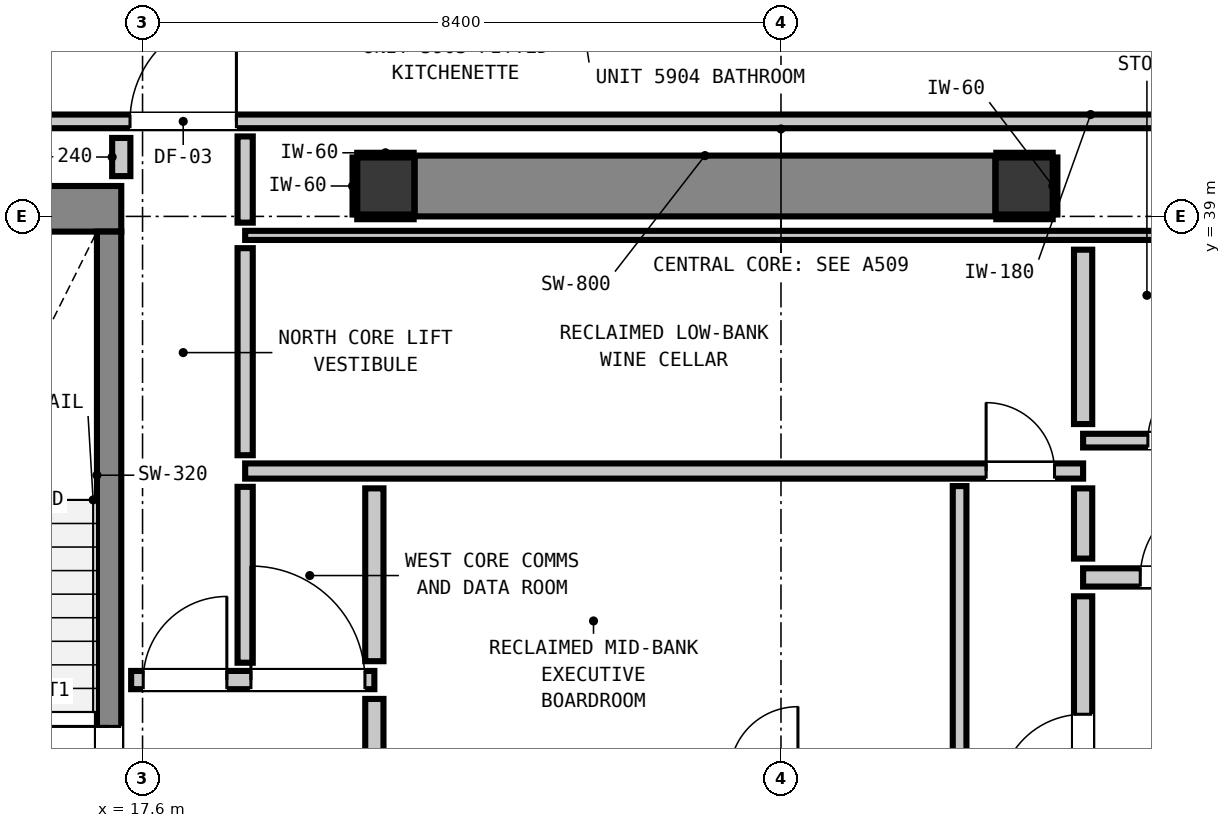
"""IFC4 building model, lengths in metres.
Left out: names, types, materials, properties, quantities, classifications, styles, units other than length and angle.
Written with IfcOpenShell. Run it as: python <this file> out.ifc"""

import sys

from ifc_helpers import new_model, si_unit, direction, frame, frame_2d, origin, origin_2d, place, context, subcontext, project, spatial, rectangle, extrude, element, fill, save


model = new_model("IFC4")
c1 = context("Model", 3, precision=1e-05, world=origin(), true_north=direction((0.0, 1.0)))
c2 = subcontext(c1, "Body", "Model", "MODEL_VIEW")
j1 = project(units=[si_unit("LENGTHUNIT", "METRE"), si_unit("PLANEANGLEUNIT", "RADIAN")], contexts=[c1])
p1 = place(None, origin())
s1 = spatial("IfcSite", under=j1, at=p1, CompositionType="ELEMENT")
p2 = place(p1, origin())
s2 = spatial("IfcBuilding", under=s1, at=p2, CompositionType="ELEMENT")
p3 = place(p2, frame((0.0, 0.0, 203.44)))
s3 = spatial("IfcBuildingStorey", under=s2, at=p3, CompositionType="ELEMENT", Elevation=203.44)
for number, where, z_axis, x_axis in (
    (1, (20.8, 39.4, 0.0), (0.0, 0.0, 1.0), (1.0, 0.0, 0.0)),
    (2, (29.2, 39.4, 0.0), (0.0, 0.0, 1.0), (1.0, 0.0, 0.0)),
):
    element("IfcColumn", number, at=place(p3, frame(where, z_axis=z_axis, x_axis=x_axis)), inside=s3, PredefinedType="COLUMN", context=c2, shape_type="SweptSolid", body=[
        extrude(rectangle(XDim=0.75, YDim=0.75, at=origin_2d()), origin(), (0.0, 0.0, 1.0), 3.32),
    ])
p4 = place(p3, frame((13.24, 39.1, 0.0), z_axis=(0.0, 0.0, 1.0), x_axis=(1.0, 0.0, 0.0)))
e3 = element("IfcWall", 3, at=p4, inside=s3, PredefinedType="SHEAR", context=c2, shape_type="SweptSolid", body=[
    extrude(rectangle(XDim=4.08, YDim=0.6, at=frame_2d((2.04, 0.0))), origin(), (0.0, 0.0, 1.0), 3.32),
])
p5 = place(p3, frame((21.18, 39.4, 0.0), z_axis=(0.0, 0.0, 1.0), x_axis=(1.0, 0.0, 0.0)))
e4 = element("IfcWall", 4, at=p5, inside=s3, PredefinedType="SHEAR", context=c2, shape_type="SweptSolid", body=[
    extrude(rectangle(XDim=7.64, YDim=0.8, at=frame_2d((3.82, 0.0))), origin(), (0.0, 0.0, 1.0), 3.32),
])
p6 = place(p3, frame((17.16, 31.0, 0.0), z_axis=(0.0, 0.0, 1.0), x_axis=(0.0, 1.0, 0.0)))
e5 = element("IfcWall", 5, at=p6, inside=s3, PredefinedType="SHEAR", context=c2, shape_type="SweptSolid", body=[
    extrude(rectangle(XDim=7.8, YDim=0.32, at=frame_2d((3.9, 0.0))), origin(), (0.0, 0.0, 1.0), 3.32),
])
p7 = place(p6, frame((0.19, 0.0, 0.0)))
e6 = element("IfcOpeningElement", 6, at=p7, cuts=e5, PredefinedType="OPENING", context=c2, shape_type="SweptSolid", body=[
    extrude(rectangle(XDim=1.1, YDim=2.15, at=frame_2d((0.55, 1.075))), frame((0.0, 0.17, 0.0), z_axis=(0.0, -1.0, 0.0), x_axis=(1.0, 0.0, 0.0)), (0.0, 0.0, 1.0), 0.34),
])
p8 = place(p3, frame((17.45, 32.9, 0.0), z_axis=(0.0, 0.0, 1.0), x_axis=(1.0, 0.0, 0.0)))
e7 = element("IfcWall", 7, at=p8, inside=s3, PredefinedType="PARTITIONING", context=c2, shape_type="SweptSolid", body=[
    extrude(rectangle(XDim=3.2, YDim=0.24, at=frame_2d((1.6, 0.0))), origin(), (0.0, 0.0, 1.0), 3.1),
])
p9 = place(p8, frame((0.159, 0.0, 0.0)))
e8 = element("IfcOpeningElement", 8, at=p9, cuts=e7, PredefinedType="OPENING", context=c2, shape_type="SweptSolid", body=[
    extrude(rectangle(XDim=1.1, YDim=2.15, at=frame_2d((0.55, 1.075))), frame((0.0, 0.13, 0.0), z_axis=(0.0, -1.0, 0.0), x_axis=(1.0, 0.0, 0.0)), (0.0, 0.0, 1.0), 0.26),
])
p10 = place(p8, frame((1.576, 0.0, 0.0)))
e9 = element("IfcOpeningElement", 9, at=p10, cuts=e7, PredefinedType="OPENING", context=c2, shape_type="SweptSolid", body=[
    extrude(rectangle(XDim=1.5, YDim=2.15, at=frame_2d((0.75, 1.075))), frame((0.0, 0.13, 0.0), z_axis=(0.0, -1.0, 0.0), x_axis=(1.0, 0.0, 0.0)), (0.0, 0.0, 1.0), 0.26),
])
p11 = place(p3, frame((29.975, 34.25, 0.0), z_axis=(0.0, 0.0, 1.0), x_axis=(1.0, 0.0, 0.0)))
e10 = element("IfcWall", 10, at=p11, inside=s3, PredefinedType="PARTITIONING", context=c2, shape_type="SweptSolid", body=[
    extrude(rectangle(XDim=2.475, YDim=0.24, at=frame_2d((1.237, 0.0))), origin(), (0.0, 0.0, 1.0), 3.1),
])
p12 = place(p11, frame((0.752, 0.0, 0.0)))
e11 = element("IfcOpeningElement", 11, at=p12, cuts=e10, PredefinedType="OPENING", context=c2, shape_type="SweptSolid", body=[
    extrude(rectangle(XDim=1.1, YDim=2.15, at=frame_2d((0.55, 1.075))), frame((0.0, 0.13, 0.0), z_axis=(0.0, -1.0, 0.0), x_axis=(1.0, 0.0, 0.0)), (0.0, 0.0, 1.0), 0.26),
])
p13 = place(p3, frame((18.95, 35.65, 0.0), z_axis=(0.0, 0.0, 1.0), x_axis=(1.0, 0.0, 0.0)))
e12 = element("IfcWall", 12, at=p13, inside=s3, PredefinedType="PARTITIONING", context=c2, shape_type="SweptSolid", body=[
    extrude(rectangle(XDim=11.025, YDim=0.2, at=frame_2d((5.513, 0.0))), origin(), (0.0, 0.0, 1.0), 3.1),
])
p14 = place(p13, frame((9.749, 0.0, 0.0)))
e13 = element("IfcOpeningElement", 13, at=p14, cuts=e12, PredefinedType="OPENING", context=c2, shape_type="SweptSolid", body=[
    extrude(rectangle(XDim=0.9, YDim=2.1, at=frame_2d((0.45, 1.05))), frame((0.0, 0.11, 0.0), z_axis=(0.0, -1.0, 0.0), x_axis=(1.0, 0.0, 0.0)), (0.0, 0.0, 1.0), 0.22),
])
p15 = place(p3, frame((29.975, 36.05, 0.0), z_axis=(0.0, 0.0, 1.0), x_axis=(1.0, 0.0, 0.0)))
e14 = element("IfcWall", 14, at=p15, inside=s3, PredefinedType="PARTITIONING", context=c2, shape_type="SweptSolid", body=[
    extrude(rectangle(XDim=2.505, YDim=0.18, at=frame_2d((1.252, 0.0))), origin(), (0.0, 0.0, 1.0), 3.1),
])
p16 = place(p15, frame((0.852, 0.0, 0.0)))
e15 = element("IfcOpeningElement", 15, at=p16, cuts=e14, PredefinedType="OPENING", context=c2, shape_type="SweptSolid", body=[
    extrude(rectangle(XDim=0.9, YDim=2.1, at=frame_2d((0.45, 1.05))), frame((0.0, 0.1, 0.0), z_axis=(0.0, -1.0, 0.0), x_axis=(1.0, 0.0, 0.0)), (0.0, 0.0, 1.0), 0.2),
])
p17 = place(p3, frame((13.012, 40.25, 0.0), z_axis=(0.0, 0.0, 1.0), x_axis=(1.0, 0.0, 0.0)))
e16 = element("IfcWall", 16, at=p17, inside=s3, PredefinedType="PARTITIONING", context=c2, shape_type="SweptSolid", body=[
    extrude(rectangle(XDim=28.201, YDim=0.18, at=frame_2d((14.101, 0.0))), origin(), (0.0, 0.0, 1.0), 3.1),
])
p18 = place(p17, frame((4.423, 0.0, 0.0)))
e17 = element("IfcOpeningElement", 17, at=p18, cuts=e16, PredefinedType="OPENING", context=c2, shape_type="SweptSolid", body=[
    extrude(rectangle(XDim=1.4, YDim=2.15, at=frame_2d((0.7, 1.075))), frame((0.0, 0.1, 0.0), z_axis=(0.0, -1.0, 0.0), x_axis=(1.0, 0.0, 0.0)), (0.0, 0.0, 1.0), 0.2),
])
p19 = place(p3, frame((18.95, 38.75, 0.0), z_axis=(0.0, 0.0, 1.0), x_axis=(1.0, 0.0, 0.0)))
e18 = element("IfcWall", 18, at=p19, inside=s3, PredefinedType="PARTITIONING", context=c2, shape_type="SweptSolid", body=[
    extrude(rectangle(XDim=13.56, YDim=0.12, at=frame_2d((6.78, 0.0))), origin(), (0.0, 0.0, 1.0), 3.1),
])
p20 = place(p3, frame((17.32, 39.53, 0.0), z_axis=(0.0, 0.0, 1.0), x_axis=(0.0, 1.0, 0.0)))
e19 = element("IfcWall", 19, at=p20, inside=s3, PredefinedType="PARTITIONING", context=c2, shape_type="SweptSolid", body=[
    extrude(rectangle(XDim=0.502, YDim=0.24, at=frame_2d((0.251, 0.0))), origin(), (0.0, 0.0, 1.0), 3.1),
])
p21 = place(p3, frame((20.65, 31.868, 0.0), z_axis=(0.0, 0.0, 1.0), x_axis=(0.0, 1.0, 0.0)))
e20 = element("IfcWall", 20, at=p21, inside=s3, PredefinedType="PARTITIONING", context=c2, shape_type="SweptSolid", body=[
    extrude(rectangle(XDim=0.784, YDim=0.24, at=frame_2d((0.392, 0.0))), origin(), (0.0, 0.0, 1.0), 2.335),
])
p22 = place(p3, frame((20.65, 33.148, 0.0), z_axis=(0.0, 0.0, 1.0), x_axis=(0.0, 1.0, 0.0)))
e21 = element("IfcWall", 21, at=p22, inside=s3, PredefinedType="PARTITIONING", context=c2, shape_type="SweptSolid", body=[
    extrude(rectangle(XDim=2.274, YDim=0.24, at=frame_2d((1.137, 0.0))), origin(), (0.0, 0.0, 1.0), 2.335),
])
p23 = place(p3, frame((29.975, 29.768, 0.0), z_axis=(0.0, 0.0, 1.0), x_axis=(0.0, 1.0, 0.0)))
e22 = element("IfcWall", 22, at=p23, inside=s3, PredefinedType="PARTITIONING", context=c2, shape_type="SweptSolid", body=[
    extrude(rectangle(XDim=4.234, YDim=0.24, at=frame_2d((2.117, 0.0))), origin(), (0.0, 0.0, 1.0), 3.1),
])
p24 = place(p23, frame((1.582, 0.0, 0.0)))
e23 = element("IfcOpeningElement", 23, at=p24, cuts=e22, PredefinedType="OPENING", context=c2, shape_type="SweptSolid", body=[
    extrude(rectangle(XDim=1.1, YDim=2.15, at=frame_2d((0.55, 1.075))), frame((0.0, 0.13, 0.0), z_axis=(0.0, -1.0, 0.0), x_axis=(1.0, 0.0, 0.0)), (0.0, 0.0, 1.0), 0.26),
])
p25 = place(p3, frame((29.975, 34.498, 0.0), z_axis=(0.0, 0.0, 1.0), x_axis=(0.0, 1.0, 0.0)))
e24 = element("IfcWall", 24, at=p25, inside=s3, PredefinedType="PARTITIONING", context=c2, shape_type="SweptSolid", body=[
    extrude(rectangle(XDim=0.924, YDim=0.24, at=frame_2d((0.462, 0.0))), origin(), (0.0, 0.0, 1.0), 3.1),
])
p26 = place(p3, frame((29.975, 36.268, 0.0), z_axis=(0.0, 0.0, 1.0), x_axis=(0.0, 1.0, 0.0)))
e25 = element("IfcWall", 25, at=p26, inside=s3, PredefinedType="PARTITIONING", context=c2, shape_type="SweptSolid", body=[
    extrude(rectangle(XDim=2.294, YDim=0.24, at=frame_2d((1.147, 0.0))), origin(), (0.0, 0.0, 1.0), 3.1),
])
p27 = place(p3, frame((18.95, 33.128, 0.0), z_axis=(0.0, 0.0, 1.0), x_axis=(0.0, 1.0, 0.0)))
e26 = element("IfcWall", 26, at=p27, inside=s3, PredefinedType="PARTITIONING", context=c2, shape_type="SweptSolid", body=[
    extrude(rectangle(XDim=2.314, YDim=0.2, at=frame_2d((1.157, 0.0))), origin(), (0.0, 0.0, 1.0), 3.1),
])
p28 = place(p3, frame((18.95, 35.858, 0.0), z_axis=(0.0, 0.0, 1.0), x_axis=(0.0, 1.0, 0.0)))
e27 = element("IfcWall", 27, at=p28, inside=s3, PredefinedType="PARTITIONING", context=c2, shape_type="SweptSolid", body=[
    extrude(rectangle(XDim=2.724, YDim=0.2, at=frame_2d((1.362, 0.0))), origin(), (0.0, 0.0, 1.0), 3.1),
])
p29 = place(p3, frame((18.95, 38.918, 0.0), z_axis=(0.0, 0.0, 1.0), x_axis=(0.0, 1.0, 0.0)))
e28 = element("IfcWall", 28, at=p29, inside=s3, PredefinedType="PARTITIONING", context=c2, shape_type="SweptSolid", body=[
    extrude(rectangle(XDim=1.134, YDim=0.2, at=frame_2d((0.567, 0.0))), origin(), (0.0, 0.0, 1.0), 3.1),
])
p30 = place(p3, frame((28.35, 31.838, 0.0), z_axis=(0.0, 0.0, 1.0), x_axis=(0.0, 1.0, 0.0)))
e29 = element("IfcWall", 29, at=p30, inside=s3, PredefinedType="PARTITIONING", context=c2, shape_type="SweptSolid", body=[
    extrude(rectangle(XDim=3.614, YDim=0.18, at=frame_2d((1.807, 0.0))), origin(), (0.0, 0.0, 1.0), 3.1),
])
for number, where, z_axis, x_axis in (
    (30, (20.425, 38.993, 0.0), (0.0, 0.0, 1.0), (1.0, 0.0, 0.0)),
    (31, (20.425, 39.807, 0.0), (0.0, 0.0, 1.0), (1.0, 0.0, 0.0)),
):
    element("IfcWall", number, at=place(p3, frame(where, z_axis=z_axis, x_axis=x_axis)), inside=s3, PredefinedType="PARTITIONING", context=c2, shape_type="SweptSolid", body=[
        extrude(rectangle(XDim=0.742, YDim=0.06, at=frame_2d((0.371, 0.0))), origin(), (0.0, 0.0, 1.0), 1.45),
    ])
p31 = place(p3, frame((20.393, 39.025, 0.0), z_axis=(0.0, 0.0, 1.0), x_axis=(0.0, 1.0, 0.0)))
e32 = element("IfcWall", 32, at=p31, inside=s3, PredefinedType="PARTITIONING", context=c2, shape_type="SweptSolid", body=[
    extrude(rectangle(XDim=0.75, YDim=0.06, at=frame_2d((0.375, 0.0))), origin(), (0.0, 0.0, 1.0), 1.45),
])
for number, where, z_axis, x_axis in (
    (33, (28.833, 38.993, 0.0), (0.0, 0.0, 1.0), (1.0, 0.0, 0.0)),
    (34, (28.833, 39.807, 0.0), (0.0, 0.0, 1.0), (1.0, 0.0, 0.0)),
):
    element("IfcWall", number, at=place(p3, frame(where, z_axis=z_axis, x_axis=x_axis)), inside=s3, PredefinedType="PARTITIONING", context=c2, shape_type="SweptSolid", body=[
        extrude(rectangle(XDim=0.742, YDim=0.06, at=frame_2d((0.371, 0.0))), origin(), (0.0, 0.0, 1.0), 1.45),
    ])
p32 = place(p3, frame((29.607, 39.025, 0.0), z_axis=(0.0, 0.0, 1.0), x_axis=(0.0, 1.0, 0.0)))
e35 = element("IfcWall", 35, at=p32, inside=s3, PredefinedType="PARTITIONING", context=c2, shape_type="SweptSolid", body=[
    extrude(rectangle(XDim=0.75, YDim=0.06, at=frame_2d((0.375, 0.0))), origin(), (0.0, 0.0, 1.0), 1.45),
])
p33 = place(p7, origin())
e36 = element("IfcDoor", 36, at=p33, inside=s3, OperationType="SINGLE_SWING_RIGHT", PredefinedType="DOOR", context=c2, shape_type="SweptSolid", body=[
    extrude(rectangle(XDim=1.1, YDim=2.15, at=frame_2d((0.55, 1.075))), frame((0.0, 0.025, 0.0), z_axis=(0.0, -1.0, 0.0), x_axis=(1.0, 0.0, 0.0)), (0.0, 0.0, 1.0), 0.05),
])
fill(e6, e36)
p34 = place(p9, origin())
e37 = element("IfcDoor", 37, at=p34, inside=s3, OperationType="SINGLE_SWING_RIGHT", PredefinedType="DOOR", context=c2, shape_type="SweptSolid", body=[
    extrude(rectangle(XDim=1.1, YDim=2.15, at=frame_2d((0.55, 1.075))), frame((0.0, 0.025, 0.0), z_axis=(0.0, -1.0, 0.0), x_axis=(1.0, 0.0, 0.0)), (0.0, 0.0, 1.0), 0.05),
])
fill(e8, e37)
p35 = place(p24, origin())
e38 = element("IfcDoor", 38, at=p35, inside=s3, OperationType="SINGLE_SWING_LEFT", PredefinedType="DOOR", context=c2, shape_type="SweptSolid", body=[
    extrude(rectangle(XDim=1.1, YDim=2.15, at=frame_2d((0.55, 1.075))), frame((0.0, 0.025, 0.0), z_axis=(0.0, -1.0, 0.0), x_axis=(1.0, 0.0, 0.0)), (0.0, 0.0, 1.0), 0.05),
])
fill(e23, e38)
p36 = place(p12, origin())
e39 = element("IfcDoor", 39, at=p36, inside=s3, OperationType="SINGLE_SWING_RIGHT", PredefinedType="DOOR", context=c2, shape_type="SweptSolid", body=[
    extrude(rectangle(XDim=1.1, YDim=2.15, at=frame_2d((0.55, 1.075))), frame((0.0, 0.025, 0.0), z_axis=(0.0, -1.0, 0.0), x_axis=(1.0, 0.0, 0.0)), (0.0, 0.0, 1.0), 0.05),
])
fill(e11, e39)
p37 = place(p18, origin())
e40 = element("IfcDoor", 40, at=p37, inside=s3, OperationType="SINGLE_SWING_RIGHT", PredefinedType="DOOR", context=c2, shape_type="SweptSolid", body=[
    extrude(rectangle(XDim=1.4, YDim=2.15, at=frame_2d((0.7, 1.075))), frame((0.0, 0.025, 0.0), z_axis=(0.0, -1.0, 0.0), x_axis=(1.0, 0.0, 0.0)), (0.0, 0.0, 1.0), 0.05),
])
fill(e17, e40)
p38 = place(p10, origin())
e41 = element("IfcDoor", 41, at=p38, inside=s3, OperationType="SINGLE_SWING_LEFT", PredefinedType="DOOR", context=c2, shape_type="SweptSolid", body=[
    extrude(rectangle(XDim=1.5, YDim=2.15, at=frame_2d((0.75, 1.075))), frame((0.0, 0.025, 0.0), z_axis=(0.0, -1.0, 0.0), x_axis=(1.0, 0.0, 0.0)), (0.0, 0.0, 1.0), 0.05),
])
fill(e9, e41)
p39 = place(p16, origin())
e42 = element("IfcDoor", 42, at=p39, inside=s3, OperationType="SINGLE_SWING_RIGHT", PredefinedType="DOOR", context=c2, shape_type="SweptSolid", body=[
    extrude(rectangle(XDim=0.9, YDim=2.1, at=frame_2d((0.45, 1.05))), frame((0.0, 0.025, 0.0), z_axis=(0.0, -1.0, 0.0), x_axis=(1.0, 0.0, 0.0)), (0.0, 0.0, 1.0), 0.05),
])
fill(e15, e42)
p40 = place(p14, origin())
e43 = element("IfcDoor", 43, at=p40, inside=s3, OperationType="SINGLE_SWING_LEFT", PredefinedType="DOOR", context=c2, shape_type="SweptSolid", body=[
    extrude(rectangle(XDim=0.9, YDim=2.1, at=frame_2d((0.45, 1.05))), frame((0.0, 0.025, 0.0), z_axis=(0.0, -1.0, 0.0), x_axis=(1.0, 0.0, 0.0)), (0.0, 0.0, 1.0), 0.05),
])
fill(e13, e43)
save(model, sys.argv[1])
